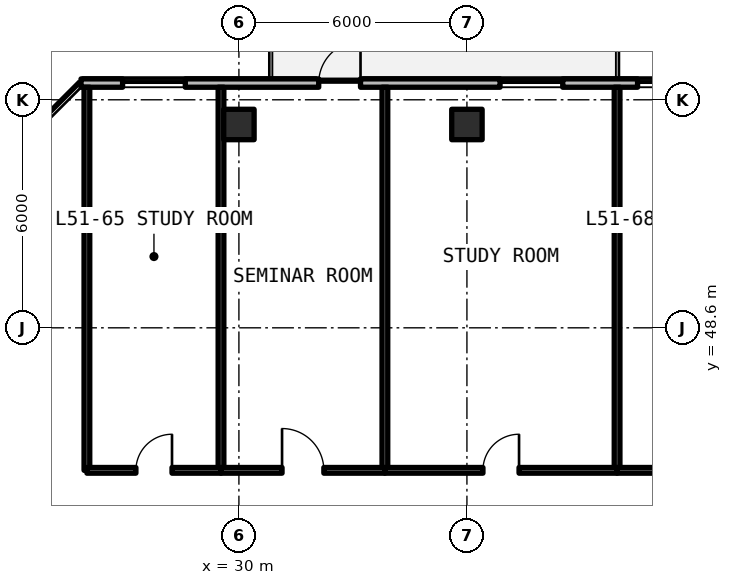
"""IFC4 building model, lengths in metres.
Left out: names, types, materials, properties, quantities, classifications, styles, units other than length and angle.
Written with IfcOpenShell. Run it as: python <this file> out.ifc"""

import sys

from ifc_helpers import new_model, si_unit, direction, frame, frame_2d, origin, origin_2d, place, context, subcontext, project, spatial, rectangle, extrude, element, fill, save


model = new_model("IFC4")
c1 = context("Model", 3, precision=1e-05, world=origin(), true_north=direction((0.0, 1.0)))
c2 = subcontext(c1, "Body", "Model", "MODEL_VIEW")
j1 = project(units=[si_unit("LENGTHUNIT", "METRE"), si_unit("PLANEANGLEUNIT", "RADIAN")], contexts=[c1])
p1 = place(None, origin())
s1 = spatial("IfcSite", under=j1, at=p1, CompositionType="ELEMENT")
p2 = place(p1, origin())
s2 = spatial("IfcBuilding", under=s1, at=p2, CompositionType="ELEMENT")
p3 = place(p2, frame((0.0, 0.0, 185.13)))
s3 = spatial("IfcBuildingStorey", under=s2, at=p3, CompositionType="ELEMENT", Elevation=185.13)
for number, where, z_axis, x_axis in (
    (1, (30.0, 53.95, 0.0), (0.0, 0.0, 1.0), (1.0, 0.0, 0.0)),
    (2, (36.0, 53.95, 0.0), (0.0, 0.0, 1.0), (1.0, 0.0, 0.0)),
):
    element("IfcColumn", number, at=place(p3, frame(where, z_axis=z_axis, x_axis=x_axis)), inside=s3, PredefinedType="COLUMN", context=c2, shape_type="SweptSolid", body=[
        extrude(rectangle(XDim=0.8, YDim=0.8, at=origin_2d()), origin(), (0.0, 0.0, 1.0), 3.3),
    ])
p4 = place(p3, frame((43.49, 55.04, 0.0), z_axis=(0.0, 0.0, 1.0), x_axis=(-1.0, 0.0, 0.0)))
e3 = element("IfcWall", 3, at=p4, inside=s3, PredefinedType="SOLIDWALL", context=c2, shape_type="SweptSolid", body=[
    extrude(rectangle(XDim=17.644, YDim=0.22, at=frame_2d((8.822, 0.0))), origin(), (0.0, 0.0, 1.0), 3.08),
])
p5 = place(p4, frame((10.29, 0.0, 0.0)))
e4 = element("IfcOpeningElement", 4, at=p5, cuts=e3, PredefinedType="OPENING", context=c2, shape_type="SweptSolid", body=[
    extrude(rectangle(XDim=1.1, YDim=2.15, at=frame_2d((0.55, 1.075))), frame((0.0, 0.12, 0.0), z_axis=(0.0, -1.0, 0.0), x_axis=(1.0, 0.0, 0.0)), (0.0, 0.0, 1.0), 0.24),
])
p6 = place(p4, frame((14.901, 0.0, 0.78)))
e5 = element("IfcOpeningElement", 5, at=p6, cuts=e3, PredefinedType="OPENING", context=c2, shape_type="SweptSolid", body=[
    extrude(rectangle(XDim=1.65, YDim=1.66, at=frame_2d((0.825, 0.83))), frame((0.0, 0.12, 0.0), z_axis=(0.0, -1.0, 0.0), x_axis=(1.0, 0.0, 0.0)), (0.0, 0.0, 1.0), 0.24),
])
p7 = place(p4, frame((4.969, 0.0, 0.78)))
e6 = element("IfcOpeningElement", 6, at=p7, cuts=e3, PredefinedType="OPENING", context=c2, shape_type="SweptSolid", body=[
    extrude(rectangle(XDim=1.65, YDim=1.66, at=frame_2d((0.825, 0.83))), frame((0.0, 0.12, 0.0), z_axis=(0.0, -1.0, 0.0), x_axis=(1.0, 0.0, 0.0)), (0.0, 0.0, 1.0), 0.24),
])
p8 = place(p4, frame((2.149, 0.0, 0.78)))
e7 = element("IfcOpeningElement", 7, at=p8, cuts=e3, PredefinedType="OPENING", context=c2, shape_type="SweptSolid", body=[
    extrude(rectangle(XDim=0.85, YDim=1.65, at=frame_2d((0.425, 0.825))), frame((0.0, 0.12, 0.0), z_axis=(0.0, -1.0, 0.0), x_axis=(1.0, 0.0, 0.0)), (0.0, 0.0, 1.0), 0.24),
])
for number, where, z_axis, x_axis in (
    (8, (26.0, 44.85, 0.0), (0.0, 0.0, 1.0), (0.0, 1.0, 0.0)),
    (9, (29.529, 44.85, 0.0), (0.0, 0.0, 1.0), (0.0, 1.0, 0.0)),
):
    element("IfcWall", number, at=place(p3, frame(where, z_axis=z_axis, x_axis=x_axis)), inside=s3, PredefinedType="SOLIDWALL", context=c2, shape_type="SweptSolid", body=[
        extrude(rectangle(XDim=10.08, YDim=0.15, at=frame_2d((5.04, 0.0))), origin(), (0.0, 0.0, 1.0), 2.35),
    ])
p9 = place(p3, frame((26.0, 44.85, 0.0), z_axis=(0.0, 0.0, 1.0), x_axis=(1.0, 0.0, 0.0)))
e10 = element("IfcWall", 10, at=p9, inside=s3, PredefinedType="SOLIDWALL", context=c2, shape_type="SweptSolid", body=[
    extrude(rectangle(XDim=3.529, YDim=0.15, at=frame_2d((1.764, 0.0))), origin(), (0.0, 0.0, 1.0), 2.35),
])
p10 = place(p9, frame((1.289, 0.0, 0.0)))
e11 = element("IfcOpeningElement", 11, at=p10, cuts=e10, PredefinedType="OPENING", context=c2, shape_type="SweptSolid", body=[
    extrude(rectangle(XDim=0.95, YDim=2.15, at=frame_2d((0.475, 1.075))), frame((0.0, 0.085, 0.0), z_axis=(0.0, -1.0, 0.0), x_axis=(1.0, 0.0, 0.0)), (0.0, 0.0, 1.0), 0.17),
])
p11 = place(p3, frame((33.842, 44.85, 0.0), z_axis=(0.0, 0.0, 1.0), x_axis=(0.0, 1.0, 0.0)))
e12 = element("IfcWall", 12, at=p11, inside=s3, PredefinedType="SOLIDWALL", context=c2, shape_type="SweptSolid", body=[
    extrude(rectangle(XDim=10.08, YDim=0.15, at=frame_2d((5.04, 0.0))), origin(), (0.0, 0.0, 1.0), 2.35),
])
p12 = place(p3, frame((29.529, 44.85, 0.0), z_axis=(0.0, 0.0, 1.0), x_axis=(1.0, 0.0, 0.0)))
e13 = element("IfcWall", 13, at=p12, inside=s3, PredefinedType="SOLIDWALL", context=c2, shape_type="SweptSolid", body=[
    extrude(rectangle(XDim=4.313, YDim=0.15, at=frame_2d((2.156, 0.0))), origin(), (0.0, 0.0, 1.0), 2.35),
])
p13 = place(p12, frame((1.606, 0.0, 0.0)))
e14 = element("IfcOpeningElement", 14, at=p13, cuts=e13, PredefinedType="OPENING", context=c2, shape_type="SweptSolid", body=[
    extrude(rectangle(XDim=1.1, YDim=2.15, at=frame_2d((0.55, 1.075))), frame((0.0, 0.085, 0.0), z_axis=(0.0, -1.0, 0.0), x_axis=(1.0, 0.0, 0.0)), (0.0, 0.0, 1.0), 0.17),
])
p14 = place(p3, frame((39.951, 44.85, 0.0), z_axis=(0.0, 0.0, 1.0), x_axis=(0.0, 1.0, 0.0)))
e15 = element("IfcWall", 15, at=p14, inside=s3, PredefinedType="SOLIDWALL", context=c2, shape_type="SweptSolid", body=[
    extrude(rectangle(XDim=10.08, YDim=0.15, at=frame_2d((5.04, 0.0))), origin(), (0.0, 0.0, 1.0), 2.35),
])
p15 = place(p3, frame((33.842, 44.85, 0.0), z_axis=(0.0, 0.0, 1.0), x_axis=(1.0, 0.0, 0.0)))
e16 = element("IfcWall", 16, at=p15, inside=s3, PredefinedType="SOLIDWALL", context=c2, shape_type="SweptSolid", body=[
    extrude(rectangle(XDim=6.11, YDim=0.15, at=frame_2d((3.055, 0.0))), origin(), (0.0, 0.0, 1.0), 2.35),
])
p16 = place(p15, frame((2.58, 0.0, 0.0)))
e17 = element("IfcOpeningElement", 17, at=p16, cuts=e16, PredefinedType="OPENING", context=c2, shape_type="SweptSolid", body=[
    extrude(rectangle(XDim=0.95, YDim=2.15, at=frame_2d((0.475, 1.075))), frame((0.0, 0.085, 0.0), z_axis=(0.0, -1.0, 0.0), x_axis=(1.0, 0.0, 0.0)), (0.0, 0.0, 1.0), 0.17),
])
p17 = place(p3, frame((39.951, 44.85, 0.0), z_axis=(0.0, 0.0, 1.0), x_axis=(1.0, 0.0, 0.0)))
e18 = element("IfcWall", 18, at=p17, inside=s3, PredefinedType="SOLIDWALL", context=c2, shape_type="SweptSolid", body=[
    extrude(rectangle(XDim=3.529, YDim=0.15, at=frame_2d((1.764, 0.0))), origin(), (0.0, 0.0, 1.0), 2.35),
])
p18 = place(p17, frame((1.289, 0.0, 0.0)))
e19 = element("IfcOpeningElement", 19, at=p18, cuts=e18, PredefinedType="OPENING", context=c2, shape_type="SweptSolid", body=[
    extrude(rectangle(XDim=0.95, YDim=2.15, at=frame_2d((0.475, 1.075))), frame((0.0, 0.085, 0.0), z_axis=(0.0, -1.0, 0.0), x_axis=(1.0, 0.0, 0.0)), (0.0, 0.0, 1.0), 0.17),
])
p19 = place(p5, frame((1.1, 0.0, 0.0), z_axis=(0.0, 0.0, 1.0), x_axis=(-1.0, 0.0, 0.0)))
e20 = element("IfcDoor", 20, at=p19, inside=s3, OperationType="SINGLE_SWING_LEFT", PredefinedType="DOOR", context=c2, shape_type="SweptSolid", body=[
    extrude(rectangle(XDim=1.1, YDim=2.15, at=frame_2d((0.55, 1.075))), frame((0.0, 0.025, 0.0), z_axis=(0.0, -1.0, 0.0), x_axis=(1.0, 0.0, 0.0)), (0.0, 0.0, 1.0), 0.05),
])
fill(e4, e20)
p20 = place(p6, origin())
e21 = element("IfcWindow", 21, at=p20, inside=s3, PartitioningType="SINGLE_PANEL", PredefinedType="WINDOW", context=c2, shape_type="SweptSolid", body=[
    extrude(rectangle(XDim=1.65, YDim=1.66, at=frame_2d((0.825, 0.83))), frame((0.0, 0.03, 0.0), z_axis=(0.0, -1.0, 0.0), x_axis=(1.0, 0.0, 0.0)), (0.0, 0.0, 1.0), 0.06),
])
fill(e5, e21)
p21 = place(p7, origin())
e22 = element("IfcWindow", 22, at=p21, inside=s3, PartitioningType="SINGLE_PANEL", PredefinedType="WINDOW", context=c2, shape_type="SweptSolid", body=[
    extrude(rectangle(XDim=1.65, YDim=1.66, at=frame_2d((0.825, 0.83))), frame((0.0, 0.03, 0.0), z_axis=(0.0, -1.0, 0.0), x_axis=(1.0, 0.0, 0.0)), (0.0, 0.0, 1.0), 0.06),
])
fill(e6, e22)
p22 = place(p8, origin())
e23 = element("IfcWindow", 23, at=p22, inside=s3, PartitioningType="SINGLE_PANEL", PredefinedType="WINDOW", context=c2, shape_type="SweptSolid", body=[
    extrude(rectangle(XDim=0.85, YDim=1.65, at=frame_2d((0.425, 0.825))), frame((0.0, 0.03, 0.0), z_axis=(0.0, -1.0, 0.0), x_axis=(1.0, 0.0, 0.0)), (0.0, 0.0, 1.0), 0.06),
])
fill(e7, e23)
p23 = place(p10, origin())
e24 = element("IfcDoor", 24, at=p23, inside=s3, OperationType="SINGLE_SWING_RIGHT", PredefinedType="DOOR", context=c2, shape_type="SweptSolid", body=[
    extrude(rectangle(XDim=0.95, YDim=2.15, at=frame_2d((0.475, 1.075))), frame((0.0, 0.025, 0.0), z_axis=(0.0, -1.0, 0.0), x_axis=(1.0, 0.0, 0.0)), (0.0, 0.0, 1.0), 0.05),
])
fill(e11, e24)
p24 = place(p13, origin())
e25 = element("IfcDoor", 25, at=p24, inside=s3, OperationType="SINGLE_SWING_LEFT", PredefinedType="DOOR", context=c2, shape_type="SweptSolid", body=[
    extrude(rectangle(XDim=1.1, YDim=2.15, at=frame_2d((0.55, 1.075))), frame((0.0, 0.025, 0.0), z_axis=(0.0, -1.0, 0.0), x_axis=(1.0, 0.0, 0.0)), (0.0, 0.0, 1.0), 0.05),
])
fill(e14, e25)
p25 = place(p16, origin())
e26 = element("IfcDoor", 26, at=p25, inside=s3, OperationType="SINGLE_SWING_RIGHT", PredefinedType="DOOR", context=c2, shape_type="SweptSolid", body=[
    extrude(rectangle(XDim=0.95, YDim=2.15, at=frame_2d((0.475, 1.075))), frame((0.0, 0.025, 0.0), z_axis=(0.0, -1.0, 0.0), x_axis=(1.0, 0.0, 0.0)), (0.0, 0.0, 1.0), 0.05),
])
fill(e17, e26)
save(model, sys.argv[1])
